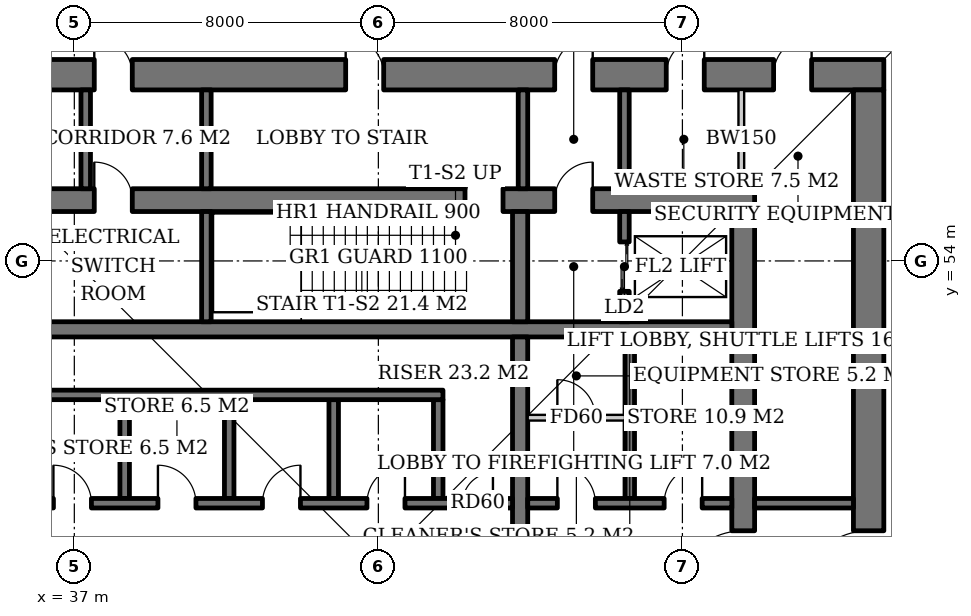
"""IFC4 building model, lengths in metres.
Left out: names, types, materials, properties, quantities, classifications, styles, units other than length and angle.
Written with IfcOpenShell. Run it as: python <this file> out.ifc"""

import sys

from ifc_helpers import new_model, si_unit, direction, frame, frame_2d, origin, place, context, subcontext, project, spatial, rectangle, extrude, element, fill, save


model = new_model("IFC4")
c1 = context("Model", 3, precision=1e-05, world=origin(), true_north=direction((0.0, 1.0)))
c2 = subcontext(c1, "Body", "Model", "MODEL_VIEW")
j1 = project(units=[si_unit("LENGTHUNIT", "METRE"), si_unit("PLANEANGLEUNIT", "RADIAN")], contexts=[c1])
p1 = place(None, origin())
s1 = spatial("IfcSite", under=j1, at=p1, CompositionType="ELEMENT")
p2 = place(p1, origin())
s2 = spatial("IfcBuilding", under=s1, at=p2, CompositionType="ELEMENT")
p3 = place(p2, frame((0.0, 0.0, -10.0)))
s3 = spatial("IfcBuildingStorey", under=s2, at=p3, CompositionType="ELEMENT", Elevation=-10.0)
p4 = place(p3, frame((35.1, 55.6, 0.0), z_axis=(0.0, 0.0, 1.0), x_axis=(1.0, 0.0, 0.0)))
e1 = element("IfcWall", 1, at=p4, inside=s3, PredefinedType="SHEAR", context=c2, shape_type="SweptSolid", body=[
    extrude(rectangle(XDim=19.8, YDim=0.6, at=frame_2d((9.9, 0.0))), origin(), (0.0, 0.0, 1.0), 5.0),
])
p5 = place(p4, frame((14.54, 0.0, 0.0)))
e2 = element("IfcOpeningElement", 2, at=p5, cuts=e1, PredefinedType="OPENING", context=c2, shape_type="SweptSolid", body=[
    extrude(rectangle(XDim=1.0, YDim=2.1, at=frame_2d((0.5, 1.05))), frame((0.0, 0.31, 0.0), z_axis=(0.0, -1.0, 0.0), x_axis=(1.0, 0.0, 0.0)), (0.0, 0.0, 1.0), 0.62),
])
p6 = place(p4, frame((12.18, 0.0, 0.0)))
e3 = element("IfcOpeningElement", 3, at=p6, cuts=e1, PredefinedType="OPENING", context=c2, shape_type="SweptSolid", body=[
    extrude(rectangle(XDim=1.0, YDim=2.1, at=frame_2d((0.5, 1.05))), frame((0.0, 0.31, 0.0), z_axis=(0.0, -1.0, 0.0), x_axis=(1.0, 0.0, 0.0)), (0.0, 0.0, 1.0), 0.62),
])
p7 = place(p4, frame((2.425, 0.0, 0.0)))
e4 = element("IfcOpeningElement", 4, at=p7, cuts=e1, PredefinedType="OPENING", context=c2, shape_type="SweptSolid", body=[
    extrude(rectangle(XDim=1.0, YDim=2.1, at=frame_2d((0.5, 1.05))), frame((0.0, 0.31, 0.0), z_axis=(0.0, -1.0, 0.0), x_axis=(1.0, 0.0, 0.0)), (0.0, 0.0, 1.0), 0.62),
])
p8 = place(p3, frame((54.6, 36.7, 0.0), z_axis=(0.0, 0.0, 1.0), x_axis=(0.0, 1.0, 0.0)))
e5 = element("IfcWall", 5, at=p8, inside=s3, PredefinedType="SHEAR", context=c2, shape_type="SweptSolid", body=[
    extrude(rectangle(XDim=18.6, YDim=0.6, at=frame_2d((9.3, 0.0))), origin(), (0.0, 0.0, 1.0), 5.0),
])
p9 = place(p8, frame((8.4, 0.0, 0.0)))
e6 = element("IfcOpeningElement", 6, at=p9, cuts=e5, PredefinedType="OPENING", context=c2, shape_type="SweptSolid", body=[
    extrude(rectangle(XDim=1.8, YDim=2.4, at=frame_2d((0.9, 1.2))), frame((0.0, 0.31, 0.0), z_axis=(0.0, -1.0, 0.0), x_axis=(1.0, 0.0, 0.0)), (0.0, 0.0, 1.0), 0.62),
])
p10 = place(p3, frame((31.7, 58.9, 0.0), z_axis=(0.0, 0.0, 1.0), x_axis=(1.0, 0.0, 0.0)))
e7 = element("IfcWall", 7, at=p10, inside=s3, PredefinedType="SHEAR", context=c2, shape_type="SweptSolid", body=[
    extrude(rectangle(XDim=26.6, YDim=0.8, at=frame_2d((13.3, 0.0))), origin(), (0.0, 0.0, 1.0), 5.0),
])
p11 = place(p10, frame((17.94, 0.0, 0.0)))
e8 = element("IfcOpeningElement", 8, at=p11, cuts=e7, PredefinedType="OPENING", context=c2, shape_type="SweptSolid", body=[
    extrude(rectangle(XDim=1.0, YDim=2.1, at=frame_2d((0.5, 1.05))), frame((0.0, 0.41, 0.0), z_axis=(0.0, -1.0, 0.0), x_axis=(1.0, 0.0, 0.0)), (0.0, 0.0, 1.0), 0.82),
])
p12 = place(p10, frame((12.44, 0.0, 0.0)))
e9 = element("IfcOpeningElement", 9, at=p12, cuts=e7, PredefinedType="OPENING", context=c2, shape_type="SweptSolid", body=[
    extrude(rectangle(XDim=1.0, YDim=2.1, at=frame_2d((0.5, 1.05))), frame((0.0, 0.41, 0.0), z_axis=(0.0, -1.0, 0.0), x_axis=(1.0, 0.0, 0.0)), (0.0, 0.0, 1.0), 0.82),
])
p13 = place(p10, frame((5.825, 0.0, 0.0)))
e10 = element("IfcOpeningElement", 10, at=p13, cuts=e7, PredefinedType="OPENING", context=c2, shape_type="SweptSolid", body=[
    extrude(rectangle(XDim=1.0, YDim=2.1, at=frame_2d((0.5, 1.05))), frame((0.0, 0.41, 0.0), z_axis=(0.0, -1.0, 0.0), x_axis=(1.0, 0.0, 0.0)), (0.0, 0.0, 1.0), 0.82),
])
p14 = place(p10, frame((2.637, 0.0, 0.0)))
e11 = element("IfcOpeningElement", 11, at=p14, cuts=e7, PredefinedType="OPENING", context=c2, shape_type="SweptSolid", body=[
    extrude(rectangle(XDim=1.0, YDim=2.1, at=frame_2d((0.5, 1.05))), frame((0.0, 0.41, 0.0), z_axis=(0.0, -1.0, 0.0), x_axis=(1.0, 0.0, 0.0)), (0.0, 0.0, 1.0), 0.82),
])
p15 = place(p10, frame((20.875, 0.0, 0.0)))
e12 = element("IfcOpeningElement", 12, at=p15, cuts=e7, PredefinedType="OPENING", context=c2, shape_type="SweptSolid", body=[
    extrude(rectangle(XDim=1.0, YDim=2.1, at=frame_2d((0.5, 1.05))), frame((0.0, 0.41, 0.0), z_axis=(0.0, -1.0, 0.0), x_axis=(1.0, 0.0, 0.0)), (0.0, 0.0, 1.0), 0.82),
])
p16 = place(p10, frame((23.7, 0.0, 0.0)))
e13 = element("IfcOpeningElement", 13, at=p16, cuts=e7, PredefinedType="OPENING", context=c2, shape_type="SweptSolid", body=[
    extrude(rectangle(XDim=1.0, YDim=2.1, at=frame_2d((0.5, 1.05))), frame((0.0, 0.41, 0.0), z_axis=(0.0, -1.0, 0.0), x_axis=(1.0, 0.0, 0.0)), (0.0, 0.0, 1.0), 0.82),
])
p17 = place(p3, frame((57.9, 33.5, 0.0), z_axis=(0.0, 0.0, 1.0), x_axis=(0.0, 1.0, 0.0)))
e14 = element("IfcWall", 14, at=p17, inside=s3, PredefinedType="SHEAR", context=c2, shape_type="SweptSolid", body=[
    extrude(rectangle(XDim=25.0, YDim=0.8, at=frame_2d((12.5, 0.0))), origin(), (0.0, 0.0, 1.0), 5.0),
])
p18 = place(p17, frame((11.6, 0.0, 0.0)))
e15 = element("IfcOpeningElement", 15, at=p18, cuts=e14, PredefinedType="OPENING", context=c2, shape_type="SweptSolid", body=[
    extrude(rectangle(XDim=1.8, YDim=2.4, at=frame_2d((0.9, 1.2))), frame((0.0, 0.41, 0.0), z_axis=(0.0, -1.0, 0.0), x_axis=(1.0, 0.0, 0.0)), (0.0, 0.0, 1.0), 0.82),
])
p19 = place(p3, frame((35.7, 52.2, 0.0), z_axis=(0.0, 0.0, 1.0), x_axis=(1.0, 0.0, 0.0)))
e16 = element("IfcWall", 16, at=p19, inside=s3, PredefinedType="SHEAR", context=c2, shape_type="SweptSolid", body=[
    extrude(rectangle(XDim=18.6, YDim=0.4, at=frame_2d((9.3, 0.0))), origin(), (0.0, 0.0, 1.0), 5.0),
])
p20 = place(p3, frame((48.73, 40.0, 0.0), z_axis=(0.0, 0.0, 1.0), x_axis=(0.0, 1.0, 0.0)))
e17 = element("IfcWall", 17, at=p20, inside=s3, PredefinedType="SHEAR", context=c2, shape_type="SweptSolid", body=[
    extrude(rectangle(XDim=12.0, YDim=0.4, at=frame_2d((6.0, 0.0))), origin(), (0.0, 0.0, 1.0), 5.0),
])
p21 = place(p3, frame((48.73, 52.4, 0.0), z_axis=(0.0, 0.0, 1.0), x_axis=(0.0, 1.0, 0.0)))
e18 = element("IfcWall", 18, at=p21, inside=s3, PredefinedType="SHEAR", context=c2, shape_type="SweptSolid", body=[
    extrude(rectangle(XDim=2.9, YDim=0.4, at=frame_2d((1.45, 0.0))), origin(), (0.0, 0.0, 1.0), 5.0),
])
p22 = place(p3, frame((40.475, 52.4, 0.0), z_axis=(0.0, 0.0, 1.0), x_axis=(0.0, 1.0, 0.0)))
e19 = element("IfcWall", 19, at=p22, inside=s3, PredefinedType="SHEAR", context=c2, shape_type="SweptSolid", body=[
    extrude(rectangle(XDim=2.9, YDim=0.25, at=frame_2d((1.45, 0.0))), origin(), (0.0, 0.0, 1.0), 5.0),
])
p23 = place(p3, frame((51.475, 52.4, 0.0), z_axis=(0.0, 0.0, 1.0), x_axis=(0.0, 1.0, 0.0)))
e20 = element("IfcWall", 20, at=p23, inside=s3, PredefinedType="SHEAR", context=c2, shape_type="SweptSolid", body=[
    extrude(rectangle(XDim=2.9, YDim=0.25, at=frame_2d((1.45, 0.0))), origin(), (0.0, 0.0, 1.0), 5.0),
])
p24 = place(p23, frame((0.8, 0.0, 0.0)))
e21 = element("IfcOpeningElement", 21, at=p24, cuts=e20, PredefinedType="OPENING", context=c2, shape_type="SweptSolid", body=[
    extrude(rectangle(XDim=1.3, YDim=2.2, at=frame_2d((0.65, 1.1))), frame((0.0, 0.135, 0.0), z_axis=(0.0, -1.0, 0.0), x_axis=(1.0, 0.0, 0.0)), (0.0, 0.0, 1.0), 0.27),
])
for number, where, z_axis, x_axis in (
    (22, (38.325, 47.75, 0.0), (0.0, 0.0, 1.0), (0.0, 1.0, 0.0)),
    (23, (41.075, 47.75, 0.0), (0.0, 0.0, 1.0), (0.0, 1.0, 0.0)),
    (24, (43.825, 47.75, 0.0), (0.0, 0.0, 1.0), (0.0, 1.0, 0.0)),
    (25, (46.575, 47.75, 0.0), (0.0, 0.0, 1.0), (0.0, 1.0, 0.0)),
):
    element("IfcWall", number, at=place(p3, frame(where, z_axis=z_axis, x_axis=x_axis)), inside=s3, PredefinedType="SHEAR", context=c2, shape_type="SweptSolid", body=[
        extrude(rectangle(XDim=2.6, YDim=0.25, at=frame_2d((1.3, 0.0))), origin(), (0.0, 0.0, 1.0), 5.0),
    ])
p25 = place(p3, frame((35.7, 50.475, 0.0), z_axis=(0.0, 0.0, 1.0), x_axis=(1.0, 0.0, 0.0)))
e26 = element("IfcWall", 26, at=p25, inside=s3, PredefinedType="SHEAR", context=c2, shape_type="SweptSolid", body=[
    extrude(rectangle(XDim=11.0, YDim=0.25, at=frame_2d((5.5, 0.0))), origin(), (0.0, 0.0, 1.0), 5.0),
])
p26 = place(p3, frame((35.7, 47.625, 0.0), z_axis=(0.0, 0.0, 1.0), x_axis=(1.0, 0.0, 0.0)))
e27 = element("IfcWall", 27, at=p26, inside=s3, PredefinedType="SHEAR", context=c2, shape_type="SweptSolid", body=[
    extrude(rectangle(XDim=12.83, YDim=0.25, at=frame_2d((6.415, 0.0))), origin(), (0.0, 0.0, 1.0), 5.0),
])
p27 = place(p26, frame((0.75, 0.0, 0.0)))
e28 = element("IfcOpeningElement", 28, at=p27, cuts=e27, PredefinedType="OPENING", context=c2, shape_type="SweptSolid", body=[
    extrude(rectangle(XDim=1.0, YDim=2.1, at=frame_2d((0.5, 1.05))), frame((0.0, 0.135, 0.0), z_axis=(0.0, -1.0, 0.0), x_axis=(1.0, 0.0, 0.0)), (0.0, 0.0, 1.0), 0.27),
])
p28 = place(p26, frame((3.5, 0.0, 0.0)))
e29 = element("IfcOpeningElement", 29, at=p28, cuts=e27, PredefinedType="OPENING", context=c2, shape_type="SweptSolid", body=[
    extrude(rectangle(XDim=1.0, YDim=2.1, at=frame_2d((0.5, 1.05))), frame((0.0, 0.135, 0.0), z_axis=(0.0, -1.0, 0.0), x_axis=(1.0, 0.0, 0.0)), (0.0, 0.0, 1.0), 0.27),
])
p29 = place(p26, frame((6.25, 0.0, 0.0)))
e30 = element("IfcOpeningElement", 30, at=p29, cuts=e27, PredefinedType="OPENING", context=c2, shape_type="SweptSolid", body=[
    extrude(rectangle(XDim=1.0, YDim=2.1, at=frame_2d((0.5, 1.05))), frame((0.0, 0.135, 0.0), z_axis=(0.0, -1.0, 0.0), x_axis=(1.0, 0.0, 0.0)), (0.0, 0.0, 1.0), 0.27),
])
p30 = place(p26, frame((9.0, 0.0, 0.0)))
e31 = element("IfcOpeningElement", 31, at=p30, cuts=e27, PredefinedType="OPENING", context=c2, shape_type="SweptSolid", body=[
    extrude(rectangle(XDim=1.0, YDim=2.1, at=frame_2d((0.5, 1.05))), frame((0.0, 0.135, 0.0), z_axis=(0.0, -1.0, 0.0), x_axis=(1.0, 0.0, 0.0)), (0.0, 0.0, 1.0), 0.27),
])
p31 = place(p26, frame((11.515, 0.0, 0.0)))
e32 = element("IfcOpeningElement", 32, at=p31, cuts=e27, PredefinedType="OPENING", context=c2, shape_type="SweptSolid", body=[
    extrude(rectangle(XDim=0.8, YDim=2.0, at=frame_2d((0.4, 1.0))), frame((0.0, 0.135, 0.0), z_axis=(0.0, -1.0, 0.0), x_axis=(1.0, 0.0, 0.0)), (0.0, 0.0, 1.0), 0.27),
])
p32 = place(p3, frame((51.615, 47.75, 0.0), z_axis=(0.0, 0.0, 1.0), x_axis=(0.0, 1.0, 0.0)))
e33 = element("IfcWall", 33, at=p32, inside=s3, PredefinedType="SHEAR", context=c2, shape_type="SweptSolid", body=[
    extrude(rectangle(XDim=4.25, YDim=0.25, at=frame_2d((2.125, 0.0))), origin(), (0.0, 0.0, 1.0), 5.0),
])
p33 = place(p3, frame((48.93, 47.625, 0.0), z_axis=(0.0, 0.0, 1.0), x_axis=(1.0, 0.0, 0.0)))
e34 = element("IfcWall", 34, at=p33, inside=s3, PredefinedType="SHEAR", context=c2, shape_type="SweptSolid", body=[
    extrude(rectangle(XDim=5.37, YDim=0.25, at=frame_2d((2.685, 0.0))), origin(), (0.0, 0.0, 1.0), 5.0),
])
p34 = place(p33, frame((0.78, 0.0, 0.0)))
e35 = element("IfcOpeningElement", 35, at=p34, cuts=e34, PredefinedType="OPENING", context=c2, shape_type="SweptSolid", body=[
    extrude(rectangle(XDim=1.0, YDim=2.1, at=frame_2d((0.5, 1.05))), frame((0.0, 0.135, 0.0), z_axis=(0.0, -1.0, 0.0), x_axis=(1.0, 0.0, 0.0)), (0.0, 0.0, 1.0), 0.27),
])
p35 = place(p33, frame((3.59, 0.0, 0.0)))
e36 = element("IfcOpeningElement", 36, at=p35, cuts=e34, PredefinedType="OPENING", context=c2, shape_type="SweptSolid", body=[
    extrude(rectangle(XDim=1.0, YDim=2.1, at=frame_2d((0.5, 1.05))), frame((0.0, 0.135, 0.0), z_axis=(0.0, -1.0, 0.0), x_axis=(1.0, 0.0, 0.0)), (0.0, 0.0, 1.0), 0.27),
])
for number, where, z_axis, x_axis in (
    (37, (48.805, 55.9, 0.0), (0.0, 0.0, 1.0), (0.0, 1.0, 0.0)),
    (38, (51.475, 55.9, 0.0), (0.0, 0.0, 1.0), (0.0, 1.0, 0.0)),
    (39, (54.9, 47.625, 0.0), (0.0, 0.0, 1.0), (1.0, 0.0, 0.0)),
    (40, (40.475, 55.9, 0.0), (0.0, 0.0, 1.0), (0.0, 1.0, 0.0)),
    (41, (37.3, 55.9, 0.0), (0.0, 0.0, 1.0), (0.0, 1.0, 0.0)),
):
    element("IfcWall", number, at=place(p3, frame(where, z_axis=z_axis, x_axis=x_axis)), inside=s3, PredefinedType="SOLIDWALL", context=c2, shape_type="SweptSolid", body=[
        extrude(rectangle(XDim=2.6, YDim=0.25, at=frame_2d((1.3, 0.0))), origin(), (0.0, 0.0, 1.0), 4.7),
    ])
p36 = place(p3, frame((48.93, 49.875, 0.0), z_axis=(0.0, 0.0, 1.0), x_axis=(1.0, 0.0, 0.0)))
e42 = element("IfcWall", 42, at=p36, inside=s3, PredefinedType="SOLIDWALL", context=c2, shape_type="SweptSolid", body=[
    extrude(rectangle(XDim=2.56, YDim=0.15, at=frame_2d((1.28, 0.0))), origin(), (0.0, 0.0, 1.0), 4.7),
])
p37 = place(p36, frame((0.78, 0.0, 0.0)))
e43 = element("IfcOpeningElement", 43, at=p37, cuts=e42, PredefinedType="OPENING", context=c2, shape_type="SweptSolid", body=[
    extrude(rectangle(XDim=1.0, YDim=2.1, at=frame_2d((0.5, 1.05))), frame((0.0, 0.085, 0.0), z_axis=(0.0, -1.0, 0.0), x_axis=(1.0, 0.0, 0.0)), (0.0, 0.0, 1.0), 0.17),
])
p38 = place(p3, frame((54.55, 55.9, 0.0), z_axis=(0.0, 0.0, 1.0), x_axis=(0.0, 1.0, 0.0)))
e44 = element("IfcWall", 44, at=p38, inside=s3, PredefinedType="SOLIDWALL", context=c2, shape_type="SweptSolid", body=[
    extrude(rectangle(XDim=2.6, YDim=0.15, at=frame_2d((1.3, 0.0))), origin(), (0.0, 0.0, 1.0), 4.7),
])
p39 = place(p24, origin())
e45 = element("IfcDoor", 45, at=p39, inside=s3, OperationType="DOUBLE_DOOR_SLIDING", PredefinedType="DOOR", context=c2, shape_type="SweptSolid", body=[
    extrude(rectangle(XDim=1.3, YDim=2.2, at=frame_2d((0.65, 1.1))), frame((0.0, 0.025, 0.0), z_axis=(0.0, -1.0, 0.0), x_axis=(1.0, 0.0, 0.0)), (0.0, 0.0, 1.0), 0.05),
])
fill(e21, e45)
p40 = place(p27, origin())
e46 = element("IfcDoor", 46, at=p40, inside=s3, OperationType="SINGLE_SWING_LEFT", PredefinedType="DOOR", context=c2, shape_type="SweptSolid", body=[
    extrude(rectangle(XDim=1.0, YDim=2.1, at=frame_2d((0.5, 1.05))), frame((0.0, 0.025, 0.0), z_axis=(0.0, -1.0, 0.0), x_axis=(1.0, 0.0, 0.0)), (0.0, 0.0, 1.0), 0.05),
])
fill(e28, e46)
p41 = place(p28, origin())
e47 = element("IfcDoor", 47, at=p41, inside=s3, OperationType="SINGLE_SWING_LEFT", PredefinedType="DOOR", context=c2, shape_type="SweptSolid", body=[
    extrude(rectangle(XDim=1.0, YDim=2.1, at=frame_2d((0.5, 1.05))), frame((0.0, 0.025, 0.0), z_axis=(0.0, -1.0, 0.0), x_axis=(1.0, 0.0, 0.0)), (0.0, 0.0, 1.0), 0.05),
])
fill(e29, e47)
p42 = place(p29, origin())
e48 = element("IfcDoor", 48, at=p42, inside=s3, OperationType="SINGLE_SWING_RIGHT", PredefinedType="DOOR", context=c2, shape_type="SweptSolid", body=[
    extrude(rectangle(XDim=1.0, YDim=2.1, at=frame_2d((0.5, 1.05))), frame((0.0, 0.025, 0.0), z_axis=(0.0, -1.0, 0.0), x_axis=(1.0, 0.0, 0.0)), (0.0, 0.0, 1.0), 0.05),
])
fill(e30, e48)
p43 = place(p30, origin())
e49 = element("IfcDoor", 49, at=p43, inside=s3, OperationType="SINGLE_SWING_RIGHT", PredefinedType="DOOR", context=c2, shape_type="SweptSolid", body=[
    extrude(rectangle(XDim=1.0, YDim=2.1, at=frame_2d((0.5, 1.05))), frame((0.0, 0.025, 0.0), z_axis=(0.0, -1.0, 0.0), x_axis=(1.0, 0.0, 0.0)), (0.0, 0.0, 1.0), 0.05),
])
fill(e31, e49)
p44 = place(p31, origin())
e50 = element("IfcDoor", 50, at=p44, inside=s3, OperationType="SINGLE_SWING_RIGHT", PredefinedType="DOOR", context=c2, shape_type="SweptSolid", body=[
    extrude(rectangle(XDim=0.8, YDim=2.0, at=frame_2d((0.4, 1.0))), frame((0.0, 0.025, 0.0), z_axis=(0.0, -1.0, 0.0), x_axis=(1.0, 0.0, 0.0)), (0.0, 0.0, 1.0), 0.05),
])
fill(e32, e50)
p45 = place(p34, origin())
e51 = element("IfcDoor", 51, at=p45, inside=s3, OperationType="SINGLE_SWING_LEFT", PredefinedType="DOOR", context=c2, shape_type="SweptSolid", body=[
    extrude(rectangle(XDim=1.0, YDim=2.1, at=frame_2d((0.5, 1.05))), frame((0.0, 0.025, 0.0), z_axis=(0.0, -1.0, 0.0), x_axis=(1.0, 0.0, 0.0)), (0.0, 0.0, 1.0), 0.05),
])
fill(e35, e51)
p46 = place(p35, origin())
e52 = element("IfcDoor", 52, at=p46, inside=s3, OperationType="SINGLE_SWING_RIGHT", PredefinedType="DOOR", context=c2, shape_type="SweptSolid", body=[
    extrude(rectangle(XDim=1.0, YDim=2.1, at=frame_2d((0.5, 1.05))), frame((0.0, 0.025, 0.0), z_axis=(0.0, -1.0, 0.0), x_axis=(1.0, 0.0, 0.0)), (0.0, 0.0, 1.0), 0.05),
])
fill(e36, e52)
p47 = place(p37, origin())
e53 = element("IfcDoor", 53, at=p47, inside=s3, OperationType="SINGLE_SWING_LEFT", PredefinedType="DOOR", context=c2, shape_type="SweptSolid", body=[
    extrude(rectangle(XDim=1.0, YDim=2.1, at=frame_2d((0.5, 1.05))), frame((0.0, 0.025, 0.0), z_axis=(0.0, -1.0, 0.0), x_axis=(1.0, 0.0, 0.0)), (0.0, 0.0, 1.0), 0.05),
])
fill(e43, e53)
p48 = place(p5, origin())
e54 = element("IfcDoor", 54, at=p48, inside=s3, OperationType="SINGLE_SWING_RIGHT", PredefinedType="DOOR", context=c2, shape_type="SweptSolid", body=[
    extrude(rectangle(XDim=1.0, YDim=2.1, at=frame_2d((0.5, 1.05))), frame((0.0, 0.025, 0.0), z_axis=(0.0, -1.0, 0.0), x_axis=(1.0, 0.0, 0.0)), (0.0, 0.0, 1.0), 0.05),
])
fill(e2, e54)
p49 = place(p9, origin())
e55 = element("IfcDoor", 55, at=p49, inside=s3, OperationType="DOUBLE_DOOR_SINGLE_SWING", PredefinedType="DOOR", context=c2, shape_type="SweptSolid", body=[
    extrude(rectangle(XDim=1.8, YDim=2.4, at=frame_2d((0.9, 1.2))), frame((0.0, 0.025, 0.0), z_axis=(0.0, -1.0, 0.0), x_axis=(1.0, 0.0, 0.0)), (0.0, 0.0, 1.0), 0.05),
])
fill(e6, e55)
p50 = place(p6, origin())
e56 = element("IfcDoor", 56, at=p50, inside=s3, OperationType="SINGLE_SWING_RIGHT", PredefinedType="DOOR", context=c2, shape_type="SweptSolid", body=[
    extrude(rectangle(XDim=1.0, YDim=2.1, at=frame_2d((0.5, 1.05))), frame((0.0, 0.025, 0.0), z_axis=(0.0, -1.0, 0.0), x_axis=(1.0, 0.0, 0.0)), (0.0, 0.0, 1.0), 0.05),
])
fill(e3, e56)
p51 = place(p18, origin())
e57 = element("IfcDoor", 57, at=p51, inside=s3, OperationType="DOUBLE_DOOR_SINGLE_SWING", PredefinedType="DOOR", context=c2, shape_type="SweptSolid", body=[
    extrude(rectangle(XDim=1.8, YDim=2.4, at=frame_2d((0.9, 1.2))), frame((0.0, 0.025, 0.0), z_axis=(0.0, -1.0, 0.0), x_axis=(1.0, 0.0, 0.0)), (0.0, 0.0, 1.0), 0.05),
])
fill(e15, e57)
p52 = place(p11, origin())
e58 = element("IfcDoor", 58, at=p52, inside=s3, OperationType="SINGLE_SWING_RIGHT", PredefinedType="DOOR", context=c2, shape_type="SweptSolid", body=[
    extrude(rectangle(XDim=1.0, YDim=2.1, at=frame_2d((0.5, 1.05))), frame((0.0, 0.025, 0.0), z_axis=(0.0, -1.0, 0.0), x_axis=(1.0, 0.0, 0.0)), (0.0, 0.0, 1.0), 0.05),
])
fill(e8, e58)
p53 = place(p12, origin())
e59 = element("IfcDoor", 59, at=p53, inside=s3, OperationType="SINGLE_SWING_LEFT", PredefinedType="DOOR", context=c2, shape_type="SweptSolid", body=[
    extrude(rectangle(XDim=1.0, YDim=2.1, at=frame_2d((0.5, 1.05))), frame((0.0, 0.025, 0.0), z_axis=(0.0, -1.0, 0.0), x_axis=(1.0, 0.0, 0.0)), (0.0, 0.0, 1.0), 0.05),
])
fill(e9, e59)
p54 = place(p13, origin())
e60 = element("IfcDoor", 60, at=p54, inside=s3, OperationType="SINGLE_SWING_LEFT", PredefinedType="DOOR", context=c2, shape_type="SweptSolid", body=[
    extrude(rectangle(XDim=1.0, YDim=2.1, at=frame_2d((0.5, 1.05))), frame((0.0, 0.025, 0.0), z_axis=(0.0, -1.0, 0.0), x_axis=(1.0, 0.0, 0.0)), (0.0, 0.0, 1.0), 0.05),
])
fill(e10, e60)
p55 = place(p7, origin())
e61 = element("IfcDoor", 61, at=p55, inside=s3, OperationType="SINGLE_SWING_LEFT", PredefinedType="DOOR", context=c2, shape_type="SweptSolid", body=[
    extrude(rectangle(XDim=1.0, YDim=2.1, at=frame_2d((0.5, 1.05))), frame((0.0, -0.24, 0.0), z_axis=(0.0, -1.0, 0.0), x_axis=(1.0, 0.0, 0.0)), (0.0, 0.0, 1.0), 0.05),
])
fill(e4, e61)
p56 = place(p15, origin())
e62 = element("IfcDoor", 62, at=p56, inside=s3, OperationType="SINGLE_SWING_RIGHT", PredefinedType="DOOR", context=c2, shape_type="SweptSolid", body=[
    extrude(rectangle(XDim=1.0, YDim=2.1, at=frame_2d((0.5, 1.05))), frame((0.0, -0.34, 0.0), z_axis=(0.0, -1.0, 0.0), x_axis=(1.0, 0.0, 0.0)), (0.0, 0.0, 1.0), 0.05),
])
fill(e12, e62)
p57 = place(p16, origin())
e63 = element("IfcDoor", 63, at=p57, inside=s3, OperationType="SINGLE_SWING_RIGHT", PredefinedType="DOOR", context=c2, shape_type="SweptSolid", body=[
    extrude(rectangle(XDim=1.0, YDim=2.1, at=frame_2d((0.5, 1.05))), frame((0.0, -0.34, 0.0), z_axis=(0.0, -1.0, 0.0), x_axis=(1.0, 0.0, 0.0)), (0.0, 0.0, 1.0), 0.05),
])
fill(e13, e63)
save(model, sys.argv[1])
